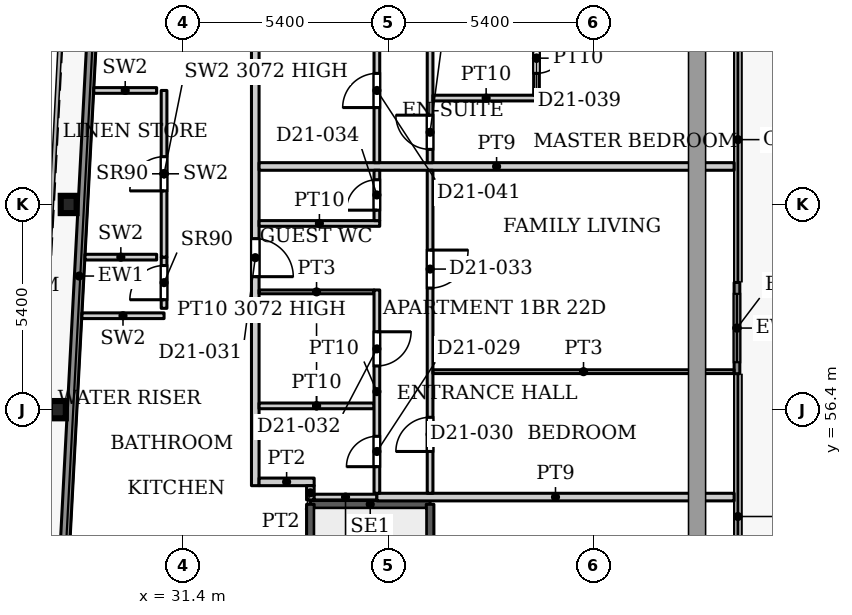
"""IFC4 building model, lengths in metres.
Left out: names, types, materials, properties, quantities, classifications, styles, units other than length and angle.
Written with IfcOpenShell. Run it as: python <this file> out.ifc"""

import sys

from ifc_helpers import new_model, si_unit, direction, frame, frame_2d, origin, origin_2d, place, context, subcontext, project, spatial, rectangle, i_section, extrude, source, transform, mapped, element, fill, save


model = new_model("IFC4")
c1 = context("Model", 3, precision=1e-05, world=origin(), true_north=direction((0.0, 1.0)))
c2 = subcontext(c1, "Body", "Model", "MODEL_VIEW")
j1 = project(units=[si_unit("LENGTHUNIT", "METRE"), si_unit("PLANEANGLEUNIT", "RADIAN")], contexts=[c1])
p1 = place(None, origin())
s1 = spatial("IfcSite", under=j1, at=p1, CompositionType="ELEMENT")
p2 = place(p1, origin())
s2 = spatial("IfcBuilding", under=s1, at=p2, CompositionType="ELEMENT")
p3 = place(p2, frame((0.0, 0.0, 98.0)))
s3 = spatial("IfcBuildingStorey", under=s2, at=p3, CompositionType="ELEMENT", Elevation=98.0)
for number, where, z_axis, x_axis in (
    (1, (28.106, 56.4, 0.0), (0.0, 0.0, 1.0), (1.0, 0.0, 0.0)),
    (2, (28.39, 61.8, 0.0), (0.0, 0.0, 1.0), (1.0, 0.0, 0.0)),
):
    element("IfcColumn", number, at=place(p3, frame(where, z_axis=z_axis, x_axis=x_axis)), inside=s3, PredefinedType="COLUMN", context=c2, shape_type="SweptSolid", body=[
        extrude(i_section(OverallWidth=0.418, OverallDepth=0.455, WebThickness=0.042, FlangeThickness=0.068, FilletRadius=0.014, at=origin_2d()), origin(), (0.0, 0.0, 1.0), 3.9),
    ])
p4 = place(p3, frame((45.975, 59.748, 0.0), z_axis=(0.0, 0.0, 1.0), x_axis=(0.0, -1.0, 0.0)))
e3 = element("IfcWall", 3, at=p4, inside=s3, PredefinedType="SOLIDWALL", context=c2, shape_type="SweptSolid", body=[
    extrude(rectangle(XDim=2.401, YDim=0.15, at=frame_2d((1.201, 0.0))), origin(), (0.0, 0.0, 1.0), 3.75),
])
p5 = place(p4, frame((0.3, 0.0, 0.0)))
e4 = element("IfcOpeningElement", 4, at=p5, cuts=e3, PredefinedType="OPENING", context=c2, shape_type="SweptSolid", body=[
    extrude(rectangle(XDim=1.8, YDim=2.4, at=frame_2d((0.9, 1.2))), frame((0.0, 0.085, 0.0), z_axis=(0.0, -1.0, 0.0), x_axis=(1.0, 0.0, 0.0)), (0.0, 0.0, 1.0), 0.17),
])
p6 = place(p3, frame((27.195, 31.969, 0.0), z_axis=(0.0, 0.0, 1.0), x_axis=(0.052559748861, 0.998617781135, 0.0)))
e5 = element("IfcWall", 5, at=p6, inside=s3, PredefinedType="SOLIDWALL", context=c2, shape_type="SweptSolid", body=[
    extrude(rectangle(XDim=55.972, YDim=0.25, at=frame_2d((27.986, 0.0))), origin(), (0.0, 0.0, 1.0), 3.75),
])
p7 = place(p3, frame((34.75, 53.91, 0.0), z_axis=(0.0, 0.0, 1.0), x_axis=(1.0, 0.0, 0.0)))
e6 = element("IfcWall", 6, at=p7, inside=s3, PredefinedType="SHEAR", context=c2, shape_type="SweptSolid", body=[
    extrude(rectangle(XDim=3.15, YDim=0.2, at=frame_2d((1.575, 0.0))), origin(), (0.0, 0.0, 1.0), 3.9),
])
p8 = place(p3, frame((34.75, 47.5, 0.0), z_axis=(0.0, 0.0, 1.0), x_axis=(0.0, 1.0, 0.0)))
e7 = element("IfcWall", 7, at=p8, inside=s3, PredefinedType="SHEAR", context=c2, shape_type="SweptSolid", body=[
    extrude(rectangle(XDim=6.41, YDim=0.2, at=frame_2d((3.205, 0.0))), origin(), (0.0, 0.0, 1.0), 3.9),
])
p9 = place(p3, frame((37.9, 44.75, 0.0), z_axis=(0.0, 0.0, 1.0), x_axis=(0.0, 1.0, 0.0)))
e8 = element("IfcWall", 8, at=p9, inside=s3, PredefinedType="SHEAR", context=c2, shape_type="SweptSolid", body=[
    extrude(rectangle(XDim=9.16, YDim=0.2, at=frame_2d((4.58, 0.0))), origin(), (0.0, 0.0, 1.0), 3.9),
])
p10 = place(p3, frame((28.739, 58.872, 0.0), z_axis=(0.0, 0.0, 1.0), x_axis=(1.0, 0.0, 0.0)))
e9 = element("IfcWall", 9, at=p10, inside=s3, PredefinedType="PARTITIONING", context=c2, shape_type="SweptSolid", body=[
    extrude(rectangle(XDim=2.161, YDim=0.15, at=frame_2d((1.081, 0.0))), origin(), (0.0, 0.0, 1.0), 3.9),
])
p11 = place(p3, frame((30.9, 59.067, 0.0), z_axis=(0.0, 0.0, 1.0), x_axis=(0.0, 1.0, 0.0)))
e10 = element("IfcWall", 10, at=p11, inside=s3, PredefinedType="PARTITIONING", context=c2, shape_type="SweptSolid", body=[
    extrude(rectangle(XDim=1.347, YDim=0.15, at=frame_2d((0.674, 0.0))), origin(), (0.0, 0.0, 1.0), 3.9),
])
p12 = place(p11, frame((0.226, 0.0, 0.0)))
e11 = element("IfcOpeningElement", 11, at=p12, cuts=e10, PredefinedType="OPENING", context=c2, shape_type="SweptSolid", body=[
    extrude(rectangle(XDim=0.9, YDim=2.2, at=frame_2d((0.45, 1.1))), frame((0.0, 0.085, 0.0), z_axis=(0.0, -1.0, 0.0), x_axis=(1.0, 0.0, 0.0)), (0.0, 0.0, 1.0), 0.17),
])
p13 = place(p3, frame((28.82, 60.414, 0.0), z_axis=(0.0, 0.0, 1.0), x_axis=(1.0, 0.0, 0.0)))
e12 = element("IfcWall", 12, at=p13, inside=s3, PredefinedType="PARTITIONING", context=c2, shape_type="SweptSolid", body=[
    extrude(rectangle(XDim=1.885, YDim=0.15, at=frame_2d((0.942, 0.0))), origin(), (0.0, 0.0, 1.0), 3.9),
])
p14 = place(p3, frame((30.9, 60.414, 0.0), z_axis=(0.0, 0.0, 1.0), x_axis=(0.0, 1.0, 0.0)))
e13 = element("IfcWall", 13, at=p14, inside=s3, PredefinedType="PARTITIONING", context=c2, shape_type="SweptSolid", body=[
    extrude(rectangle(XDim=4.386, YDim=0.15, at=frame_2d((2.193, 0.0))), origin(), (0.0, 0.0, 1.0), 3.072),
])
p15 = place(p14, frame((1.743, 0.0, 0.0)))
e14 = element("IfcOpeningElement", 14, at=p15, cuts=e13, PredefinedType="OPENING", context=c2, shape_type="SweptSolid", body=[
    extrude(rectangle(XDim=0.9, YDim=2.2, at=frame_2d((0.45, 1.1))), frame((0.0, 0.085, 0.0), z_axis=(0.0, -1.0, 0.0), x_axis=(1.0, 0.0, 0.0)), (0.0, 0.0, 1.0), 0.17),
])
p16 = place(p3, frame((29.051, 64.8, 0.0), z_axis=(0.0, 0.0, 1.0), x_axis=(1.0, 0.0, 0.0)))
e15 = element("IfcWall", 15, at=p16, inside=s3, PredefinedType="PARTITIONING", context=c2, shape_type="SweptSolid", body=[
    extrude(rectangle(XDim=1.654, YDim=0.15, at=frame_2d((0.827, 0.0))), origin(), (0.0, 0.0, 1.0), 3.9),
])
p17 = place(p3, frame((33.3, 54.4, 0.0), z_axis=(0.0, 0.0, 1.0), x_axis=(0.0, 1.0, 0.0)))
e16 = element("IfcWall", 16, at=p17, inside=s3, PredefinedType="PARTITIONING", context=c2, shape_type="SweptSolid", body=[
    extrude(rectangle(XDim=24.95, YDim=0.2, at=frame_2d((12.475, 0.0))), origin(), (0.0, 0.0, 1.0), 3.6),
])
p18 = place(p17, frame((5.5, 0.0, 0.0)))
e17 = element("IfcOpeningElement", 17, at=p18, cuts=e16, PredefinedType="OPENING", context=c2, shape_type="SweptSolid", body=[
    extrude(rectangle(XDim=1.0, YDim=2.1, at=frame_2d((0.5, 1.05))), frame((0.0, 0.11, 0.0), z_axis=(0.0, -1.0, 0.0), x_axis=(1.0, 0.0, 0.0)), (0.0, 0.0, 1.0), 0.22),
])
p19 = place(p17, frame((22.3, 0.0, 0.0)))
e18 = element("IfcOpeningElement", 18, at=p19, cuts=e16, PredefinedType="OPENING", context=c2, shape_type="SweptSolid", body=[
    extrude(rectangle(XDim=1.0, YDim=2.1, at=frame_2d((0.5, 1.05))), frame((0.0, 0.11, 0.0), z_axis=(0.0, -1.0, 0.0), x_axis=(1.0, 0.0, 0.0)), (0.0, 0.0, 1.0), 0.22),
])
p20 = place(p3, frame((33.4, 54.5, 0.0), z_axis=(0.0, 0.0, 1.0), x_axis=(1.0, 0.0, 0.0)))
e19 = element("IfcWall", 19, at=p20, inside=s3, PredefinedType="PARTITIONING", context=c2, shape_type="SweptSolid", body=[
    extrude(rectangle(XDim=1.45, YDim=0.2, at=frame_2d((0.725, 0.0))), origin(), (0.0, 0.0, 1.0), 3.6),
])
p21 = place(p3, frame((33.4, 56.5, 0.0), z_axis=(0.0, 0.0, 1.0), x_axis=(1.0, 0.0, 0.0)))
e20 = element("IfcWall", 20, at=p21, inside=s3, PredefinedType="PARTITIONING", context=c2, shape_type="SweptSolid", body=[
    extrude(rectangle(XDim=3.025, YDim=0.15, at=frame_2d((1.513, 0.0))), origin(), (0.0, 0.0, 1.0), 3.072),
])
p22 = place(p3, frame((33.4, 59.5, 0.0), z_axis=(0.0, 0.0, 1.0), x_axis=(1.0, 0.0, 0.0)))
e21 = element("IfcWall", 21, at=p22, inside=s3, PredefinedType="PARTITIONING", context=c2, shape_type="SweptSolid", body=[
    extrude(rectangle(XDim=3.025, YDim=0.1, at=frame_2d((1.513, 0.0))), origin(), (0.0, 0.0, 1.0), 3.6),
])
p23 = place(p3, frame((33.4, 61.3, 0.0), z_axis=(0.0, 0.0, 1.0), x_axis=(1.0, 0.0, 0.0)))
e22 = element("IfcWall", 22, at=p23, inside=s3, PredefinedType="PARTITIONING", context=c2, shape_type="SweptSolid", body=[
    extrude(rectangle(XDim=3.175, YDim=0.15, at=frame_2d((1.587, 0.0))), origin(), (0.0, 0.0, 1.0), 3.6),
])
p24 = place(p3, frame((33.4, 62.8, 0.0), z_axis=(0.0, 0.0, 1.0), x_axis=(1.0, 0.0, 0.0)))
e23 = element("IfcWall", 23, at=p24, inside=s3, PredefinedType="PARTITIONING", context=c2, shape_type="SweptSolid", body=[
    extrude(rectangle(XDim=12.5, YDim=0.2, at=frame_2d((6.25, 0.0))), origin(), (0.0, 0.0, 1.0), 3.6),
])
p25 = place(p3, frame((34.75, 54.025, 0.0), z_axis=(0.0, 0.0, 1.0), x_axis=(0.0, 1.0, 0.0)))
e24 = element("IfcWall", 24, at=p25, inside=s3, PredefinedType="PARTITIONING", context=c2, shape_type="SweptSolid", body=[
    extrude(rectangle(XDim=0.375, YDim=0.2, at=frame_2d((0.188, 0.0))), origin(), (0.0, 0.0, 1.0), 3.6),
])
p26 = place(p3, frame((34.85, 54.1, 0.0), z_axis=(0.0, 0.0, 1.0), x_axis=(1.0, 0.0, 0.0)))
e25 = element("IfcWall", 25, at=p26, inside=s3, PredefinedType="PARTITIONING", context=c2, shape_type="SweptSolid", body=[
    extrude(rectangle(XDim=1.65, YDim=0.15, at=frame_2d((0.825, 0.0))), origin(), (0.0, 0.0, 1.0), 3.6),
])
p27 = place(p3, frame((36.5, 54.1, 0.0), z_axis=(0.0, 0.0, 1.0), x_axis=(1.0, 0.0, 0.0)))
e26 = element("IfcWall", 26, at=p27, inside=s3, PredefinedType="PARTITIONING", context=c2, shape_type="SweptSolid", body=[
    extrude(rectangle(XDim=9.4, YDim=0.2, at=frame_2d((4.7, 0.0))), origin(), (0.0, 0.0, 1.0), 3.6),
])
p28 = place(p3, frame((36.5, 54.2, 0.0), z_axis=(0.0, 0.0, 1.0), x_axis=(0.0, 1.0, 0.0)))
e27 = element("IfcWall", 27, at=p28, inside=s3, PredefinedType="PARTITIONING", context=c2, shape_type="SweptSolid", body=[
    extrude(rectangle(XDim=5.35, YDim=0.15, at=frame_2d((2.675, 0.0))), origin(), (0.0, 0.0, 1.0), 3.6),
])
p29 = place(p28, frame((0.7, 0.0, 0.0)))
e28 = element("IfcOpeningElement", 28, at=p29, cuts=e27, PredefinedType="OPENING", context=c2, shape_type="SweptSolid", body=[
    extrude(rectangle(XDim=0.8, YDim=2.1, at=frame_2d((0.4, 1.05))), frame((0.0, 0.085, 0.0), z_axis=(0.0, -1.0, 0.0), x_axis=(1.0, 0.0, 0.0)), (0.0, 0.0, 1.0), 0.17),
])
p30 = place(p28, frame((3.35, 0.0, 0.0)))
e29 = element("IfcOpeningElement", 29, at=p30, cuts=e27, PredefinedType="OPENING", context=c2, shape_type="SweptSolid", body=[
    extrude(rectangle(XDim=0.9, YDim=2.1, at=frame_2d((0.45, 1.05))), frame((0.0, 0.085, 0.0), z_axis=(0.0, -1.0, 0.0), x_axis=(1.0, 0.0, 0.0)), (0.0, 0.0, 1.0), 0.17),
])
p31 = place(p3, frame((36.5, 61.375, 0.0), z_axis=(0.0, 0.0, 1.0), x_axis=(0.0, 1.0, 0.0)))
e30 = element("IfcWall", 30, at=p31, inside=s3, PredefinedType="PARTITIONING", context=c2, shape_type="SweptSolid", body=[
    extrude(rectangle(XDim=1.325, YDim=0.15, at=frame_2d((0.663, 0.0))), origin(), (0.0, 0.0, 1.0), 3.6),
])
p32 = place(p31, frame((0.275, 0.0, 0.0)))
e31 = element("IfcOpeningElement", 31, at=p32, cuts=e30, PredefinedType="OPENING", context=c2, shape_type="SweptSolid", body=[
    extrude(rectangle(XDim=0.8, YDim=2.1, at=frame_2d((0.4, 1.05))), frame((0.0, 0.085, 0.0), z_axis=(0.0, -1.0, 0.0), x_axis=(1.0, 0.0, 0.0)), (0.0, 0.0, 1.0), 0.17),
])
p33 = place(p3, frame((36.5, 62.9, 0.0), z_axis=(0.0, 0.0, 1.0), x_axis=(0.0, 1.0, 0.0)))
e32 = element("IfcWall", 32, at=p33, inside=s3, PredefinedType="PARTITIONING", context=c2, shape_type="SweptSolid", body=[
    extrude(rectangle(XDim=13.175, YDim=0.15, at=frame_2d((6.587, 0.0))), origin(), (0.0, 0.0, 1.0), 3.6),
])
p34 = place(p33, frame((5.8, 0.0, 0.0)))
e33 = element("IfcOpeningElement", 33, at=p34, cuts=e32, PredefinedType="OPENING", context=c2, shape_type="SweptSolid", body=[
    extrude(rectangle(XDim=0.8, YDim=2.1, at=frame_2d((0.4, 1.05))), frame((0.0, 0.085, 0.0), z_axis=(0.0, -1.0, 0.0), x_axis=(1.0, 0.0, 0.0)), (0.0, 0.0, 1.0), 0.17),
])
p35 = place(p33, frame((11.2, 0.0, 0.0)))
e34 = element("IfcOpeningElement", 34, at=p35, cuts=e32, PredefinedType="OPENING", context=c2, shape_type="SweptSolid", body=[
    extrude(rectangle(XDim=0.8, YDim=2.1, at=frame_2d((0.4, 1.05))), frame((0.0, 0.085, 0.0), z_axis=(0.0, -1.0, 0.0), x_axis=(1.0, 0.0, 0.0)), (0.0, 0.0, 1.0), 0.17),
])
p36 = place(p33, frame((1.45, 0.0, 0.0)))
e35 = element("IfcOpeningElement", 35, at=p36, cuts=e32, PredefinedType="OPENING", context=c2, shape_type="SweptSolid", body=[
    extrude(rectangle(XDim=0.9, YDim=2.1, at=frame_2d((0.45, 1.05))), frame((0.0, 0.085, 0.0), z_axis=(0.0, -1.0, 0.0), x_axis=(1.0, 0.0, 0.0)), (0.0, 0.0, 1.0), 0.17),
])
p37 = place(p33, frame((8.5, 0.0, 0.0)))
e36 = element("IfcOpeningElement", 36, at=p37, cuts=e32, PredefinedType="OPENING", context=c2, shape_type="SweptSolid", body=[
    extrude(rectangle(XDim=0.8, YDim=2.1, at=frame_2d((0.4, 1.05))), frame((0.0, 0.085, 0.0), z_axis=(0.0, -1.0, 0.0), x_axis=(1.0, 0.0, 0.0)), (0.0, 0.0, 1.0), 0.17),
])
p38 = place(p3, frame((37.9, 54.2, 0.0), z_axis=(0.0, 0.0, 1.0), x_axis=(0.0, 1.0, 0.0)))
e37 = element("IfcWall", 37, at=p38, inside=s3, PredefinedType="PARTITIONING", context=c2, shape_type="SweptSolid", body=[
    extrude(rectangle(XDim=8.5, YDim=0.15, at=frame_2d((4.25, 0.0))), origin(), (0.0, 0.0, 1.0), 3.6),
])
p39 = place(p38, frame((1.1, 0.0, 0.0)))
e38 = element("IfcOpeningElement", 38, at=p39, cuts=e37, PredefinedType="OPENING", context=c2, shape_type="SweptSolid", body=[
    extrude(rectangle(XDim=0.9, YDim=2.1, at=frame_2d((0.45, 1.05))), frame((0.0, 0.085, 0.0), z_axis=(0.0, -1.0, 0.0), x_axis=(1.0, 0.0, 0.0)), (0.0, 0.0, 1.0), 0.17),
])
p40 = place(p38, frame((5.4, 0.0, 0.0)))
e39 = element("IfcOpeningElement", 39, at=p40, cuts=e37, PredefinedType="OPENING", context=c2, shape_type="SweptSolid", body=[
    extrude(rectangle(XDim=1.0, YDim=2.1, at=frame_2d((0.5, 1.05))), frame((0.0, 0.085, 0.0), z_axis=(0.0, -1.0, 0.0), x_axis=(1.0, 0.0, 0.0)), (0.0, 0.0, 1.0), 0.17),
])
p41 = place(p3, frame((37.9, 62.9, 0.0), z_axis=(0.0, 0.0, 1.0), x_axis=(0.0, 1.0, 0.0)))
e40 = element("IfcWall", 40, at=p41, inside=s3, PredefinedType="PARTITIONING", context=c2, shape_type="SweptSolid", body=[
    extrude(rectangle(XDim=16.35, YDim=0.15, at=frame_2d((8.175, 0.0))), origin(), (0.0, 0.0, 1.0), 3.6),
])
p42 = place(p41, frame((4.85, 0.0, 0.0)))
e41 = element("IfcOpeningElement", 41, at=p42, cuts=e40, PredefinedType="OPENING", context=c2, shape_type="SweptSolid", body=[
    extrude(rectangle(XDim=0.9, YDim=2.1, at=frame_2d((0.45, 1.05))), frame((0.0, 0.085, 0.0), z_axis=(0.0, -1.0, 0.0), x_axis=(1.0, 0.0, 0.0)), (0.0, 0.0, 1.0), 0.17),
])
p43 = place(p41, frame((8.0, 0.0, 0.0)))
e42 = element("IfcOpeningElement", 42, at=p43, cuts=e40, PredefinedType="OPENING", context=c2, shape_type="SweptSolid", body=[
    extrude(rectangle(XDim=0.9, YDim=2.1, at=frame_2d((0.45, 1.05))), frame((0.0, 0.085, 0.0), z_axis=(0.0, -1.0, 0.0), x_axis=(1.0, 0.0, 0.0)), (0.0, 0.0, 1.0), 0.17),
])
p44 = place(p41, frame((14.25, 0.0, 0.0)))
e43 = element("IfcOpeningElement", 43, at=p44, cuts=e40, PredefinedType="OPENING", context=c2, shape_type="SweptSolid", body=[
    extrude(rectangle(XDim=1.0, YDim=2.1, at=frame_2d((0.5, 1.05))), frame((0.0, 0.085, 0.0), z_axis=(0.0, -1.0, 0.0), x_axis=(1.0, 0.0, 0.0)), (0.0, 0.0, 1.0), 0.17),
])
p45 = place(p41, frame((10.8, 0.0, 0.0)))
e44 = element("IfcOpeningElement", 44, at=p45, cuts=e40, PredefinedType="OPENING", context=c2, shape_type="SweptSolid", body=[
    extrude(rectangle(XDim=1.6, YDim=2.1, at=frame_2d((0.8, 1.05))), frame((0.0, 0.085, 0.0), z_axis=(0.0, -1.0, 0.0), x_axis=(1.0, 0.0, 0.0)), (0.0, 0.0, 1.0), 0.17),
])
p46 = place(p41, frame((0.35, 0.0, 0.0)))
e45 = element("IfcOpeningElement", 45, at=p46, cuts=e40, PredefinedType="OPENING", context=c2, shape_type="SweptSolid", body=[
    extrude(rectangle(XDim=0.9, YDim=2.1, at=frame_2d((0.45, 1.05))), frame((0.0, 0.085, 0.0), z_axis=(0.0, -1.0, 0.0), x_axis=(1.0, 0.0, 0.0)), (0.0, 0.0, 1.0), 0.17),
])
p47 = place(p3, frame((37.975, 57.4, 0.0), z_axis=(0.0, 0.0, 1.0), x_axis=(1.0, 0.0, 0.0)))
e46 = element("IfcWall", 46, at=p47, inside=s3, PredefinedType="PARTITIONING", context=c2, shape_type="SweptSolid", body=[
    extrude(rectangle(XDim=7.925, YDim=0.1, at=frame_2d((3.962, 0.0))), origin(), (0.0, 0.0, 1.0), 3.6),
])
p48 = place(p3, frame((37.975, 64.6, 0.0), z_axis=(0.0, 0.0, 1.0), x_axis=(1.0, 0.0, 0.0)))
e47 = element("IfcWall", 47, at=p48, inside=s3, PredefinedType="PARTITIONING", context=c2, shape_type="SweptSolid", body=[
    extrude(rectangle(XDim=2.8, YDim=0.15, at=frame_2d((1.4, 0.0))), origin(), (0.0, 0.0, 1.0), 3.6),
])
p49 = place(p3, frame((40.7, 64.675, 0.0), z_axis=(0.0, 0.0, 1.0), x_axis=(0.0, 1.0, 0.0)))
e48 = element("IfcWall", 48, at=p49, inside=s3, PredefinedType="PARTITIONING", context=c2, shape_type="SweptSolid", body=[
    extrude(rectangle(XDim=1.95, YDim=0.15, at=frame_2d((0.975, 0.0))), origin(), (0.0, 0.0, 1.0), 3.6),
])
p50 = place(p49, frame((0.575, 0.0, 0.0)))
e49 = element("IfcOpeningElement", 49, at=p50, cuts=e48, PredefinedType="OPENING", context=c2, shape_type="SweptSolid", body=[
    extrude(rectangle(XDim=0.8, YDim=2.1, at=frame_2d((0.4, 1.05))), frame((0.0, 0.085, 0.0), z_axis=(0.0, -1.0, 0.0), x_axis=(1.0, 0.0, 0.0)), (0.0, 0.0, 1.0), 0.17),
])
m1 = source(origin(), c2, "Body", "SweptSolid", [
    extrude(rectangle(XDim=1.8, YDim=2.4, at=frame_2d((0.9, 1.2))), frame((0.0, 0.025, 0.0), z_axis=(0.0, -1.0, 0.0), x_axis=(1.0, 0.0, 0.0)), (0.0, 0.0, 1.0), 0.05),
])
p51 = place(p5, origin())
e50 = element("IfcDoor", 50, at=p51, inside=s3, OperationType="SLIDING_TO_LEFT", PredefinedType="DOOR", context=c2, shape_type="MappedRepresentation", body=[
    mapped(m1, transform((0.0, 0.0, 0.0), x_axis=(1.0, 0.0, 0.0), y_axis=(0.0, 1.0, 0.0), z_axis=(0.0, 0.0, 1.0), scale=1.0)),
])
fill(e4, e50)
m2 = source(origin(), c2, "Body", "SweptSolid", [
    extrude(rectangle(XDim=0.9, YDim=2.2, at=frame_2d((0.45, 1.1))), frame((0.0, 0.025, 0.0), z_axis=(0.0, -1.0, 0.0), x_axis=(1.0, 0.0, 0.0)), (0.0, 0.0, 1.0), 0.05),
])
p52 = place(p12, origin())
e51 = element("IfcDoor", 51, at=p52, inside=s3, OperationType="SINGLE_SWING_LEFT", PredefinedType="DOOR", context=c2, shape_type="MappedRepresentation", body=[
    mapped(m2, transform((0.0, 0.0, 0.0), x_axis=(1.0, 0.0, 0.0), y_axis=(0.0, 1.0, 0.0), z_axis=(0.0, 0.0, 1.0), scale=1.0)),
])
fill(e11, e51)
p53 = place(p15, origin())
e52 = element("IfcDoor", 52, at=p53, inside=s3, OperationType="SINGLE_SWING_LEFT", PredefinedType="DOOR", context=c2, shape_type="MappedRepresentation", body=[
    mapped(m2, transform((0.0, 0.0, 0.0), x_axis=(1.0, 0.0, 0.0), y_axis=(0.0, 1.0, 0.0), z_axis=(0.0, 0.0, 1.0), scale=1.0)),
])
fill(e14, e52)
m3 = source(origin(), c2, "Body", "SweptSolid", [
    extrude(rectangle(XDim=0.8, YDim=2.1, at=frame_2d((0.4, 1.05))), frame((0.0, 0.025, 0.0), z_axis=(0.0, -1.0, 0.0), x_axis=(1.0, 0.0, 0.0)), (0.0, 0.0, 1.0), 0.05),
])
p54 = place(p29, origin())
e53 = element("IfcDoor", 53, at=p54, inside=s3, OperationType="SINGLE_SWING_LEFT", PredefinedType="DOOR", context=c2, shape_type="MappedRepresentation", body=[
    mapped(m3, transform((0.0, 0.0, 0.0), x_axis=(1.0, 0.0, 0.0), y_axis=(0.0, 1.0, 0.0), z_axis=(0.0, 0.0, 1.0), scale=1.0)),
])
fill(e28, e53)
m4 = source(origin(), c2, "Body", "SweptSolid", [
    extrude(rectangle(XDim=0.9, YDim=2.1, at=frame_2d((0.45, 1.05))), frame((0.0, 0.025, 0.0), z_axis=(0.0, -1.0, 0.0), x_axis=(1.0, 0.0, 0.0)), (0.0, 0.0, 1.0), 0.05),
])
p55 = place(p39, origin())
e54 = element("IfcDoor", 54, at=p55, inside=s3, OperationType="SINGLE_SWING_LEFT", PredefinedType="DOOR", context=c2, shape_type="MappedRepresentation", body=[
    mapped(m4, transform((0.0, 0.0, 0.0), x_axis=(1.0, 0.0, 0.0), y_axis=(0.0, 1.0, 0.0), z_axis=(0.0, 0.0, 1.0), scale=1.0)),
])
fill(e38, e54)
m5 = source(origin(), c2, "Body", "SweptSolid", [
    extrude(rectangle(XDim=1.0, YDim=2.1, at=frame_2d((0.5, 1.05))), frame((0.0, 0.025, 0.0), z_axis=(0.0, -1.0, 0.0), x_axis=(1.0, 0.0, 0.0)), (0.0, 0.0, 1.0), 0.05),
])
p56 = place(p18, origin())
e55 = element("IfcDoor", 55, at=p56, inside=s3, OperationType="SINGLE_SWING_RIGHT", PredefinedType="DOOR", context=c2, shape_type="MappedRepresentation", body=[
    mapped(m5, transform((0.0, 0.0, 0.0), x_axis=(1.0, 0.0, 0.0), y_axis=(0.0, 1.0, 0.0), z_axis=(0.0, 0.0, 1.0), scale=1.0)),
])
fill(e17, e55)
p57 = place(p30, origin())
e56 = element("IfcDoor", 56, at=p57, inside=s3, OperationType="SINGLE_SWING_RIGHT", PredefinedType="DOOR", context=c2, shape_type="MappedRepresentation", body=[
    mapped(m4, transform((0.0, 0.0, 0.0), x_axis=(1.0, 0.0, 0.0), y_axis=(0.0, 1.0, 0.0), z_axis=(0.0, 0.0, 1.0), scale=1.0)),
])
fill(e29, e56)
m6 = source(origin(), c2, "Body", "SweptSolid", [
    extrude(rectangle(XDim=1.0, YDim=2.1, at=frame_2d((0.5, 1.05))), frame((0.0, 0.025, 0.0), z_axis=(0.0, -1.0, 0.0), x_axis=(1.0, 0.0, 0.0)), (0.0, 0.0, 1.0), 0.05),
])
p58 = place(p40, origin())
e57 = element("IfcDoor", 57, at=p58, inside=s3, OperationType="SINGLE_SWING_RIGHT", PredefinedType="DOOR", context=c2, shape_type="MappedRepresentation", body=[
    mapped(m6, transform((0.0, 0.0, 0.0), x_axis=(1.0, 0.0, 0.0), y_axis=(0.0, 1.0, 0.0), z_axis=(0.0, 0.0, 1.0), scale=1.0)),
])
fill(e39, e57)
p59 = place(p32, origin())
e58 = element("IfcDoor", 58, at=p59, inside=s3, OperationType="SINGLE_SWING_LEFT", PredefinedType="DOOR", context=c2, shape_type="MappedRepresentation", body=[
    mapped(m3, transform((0.0, 0.0, 0.0), x_axis=(1.0, 0.0, 0.0), y_axis=(0.0, 1.0, 0.0), z_axis=(0.0, 0.0, 1.0), scale=1.0)),
])
fill(e31, e58)
p60 = place(p50, origin())
e59 = element("IfcDoor", 59, at=p60, inside=s3, OperationType="SINGLE_SWING_RIGHT", PredefinedType="DOOR", context=c2, shape_type="MappedRepresentation", body=[
    mapped(m3, transform((0.0, 0.0, 0.0), x_axis=(1.0, 0.0, 0.0), y_axis=(0.0, 1.0, 0.0), z_axis=(0.0, 0.0, 1.0), scale=1.0)),
])
fill(e49, e59)
p61 = place(p36, origin())
e60 = element("IfcDoor", 60, at=p61, inside=s3, OperationType="SINGLE_SWING_LEFT", PredefinedType="DOOR", context=c2, shape_type="MappedRepresentation", body=[
    mapped(m4, transform((0.0, 0.0, 0.0), x_axis=(1.0, 0.0, 0.0), y_axis=(0.0, 1.0, 0.0), z_axis=(0.0, 0.0, 1.0), scale=1.0)),
])
fill(e35, e60)
p62 = place(p46, origin())
e61 = element("IfcDoor", 61, at=p62, inside=s3, OperationType="SINGLE_SWING_LEFT", PredefinedType="DOOR", context=c2, shape_type="MappedRepresentation", body=[
    mapped(m4, transform((0.0, 0.0, 0.0), x_axis=(1.0, 0.0, 0.0), y_axis=(0.0, 1.0, 0.0), z_axis=(0.0, 0.0, 1.0), scale=1.0)),
])
fill(e45, e61)
save(model, sys.argv[1])
